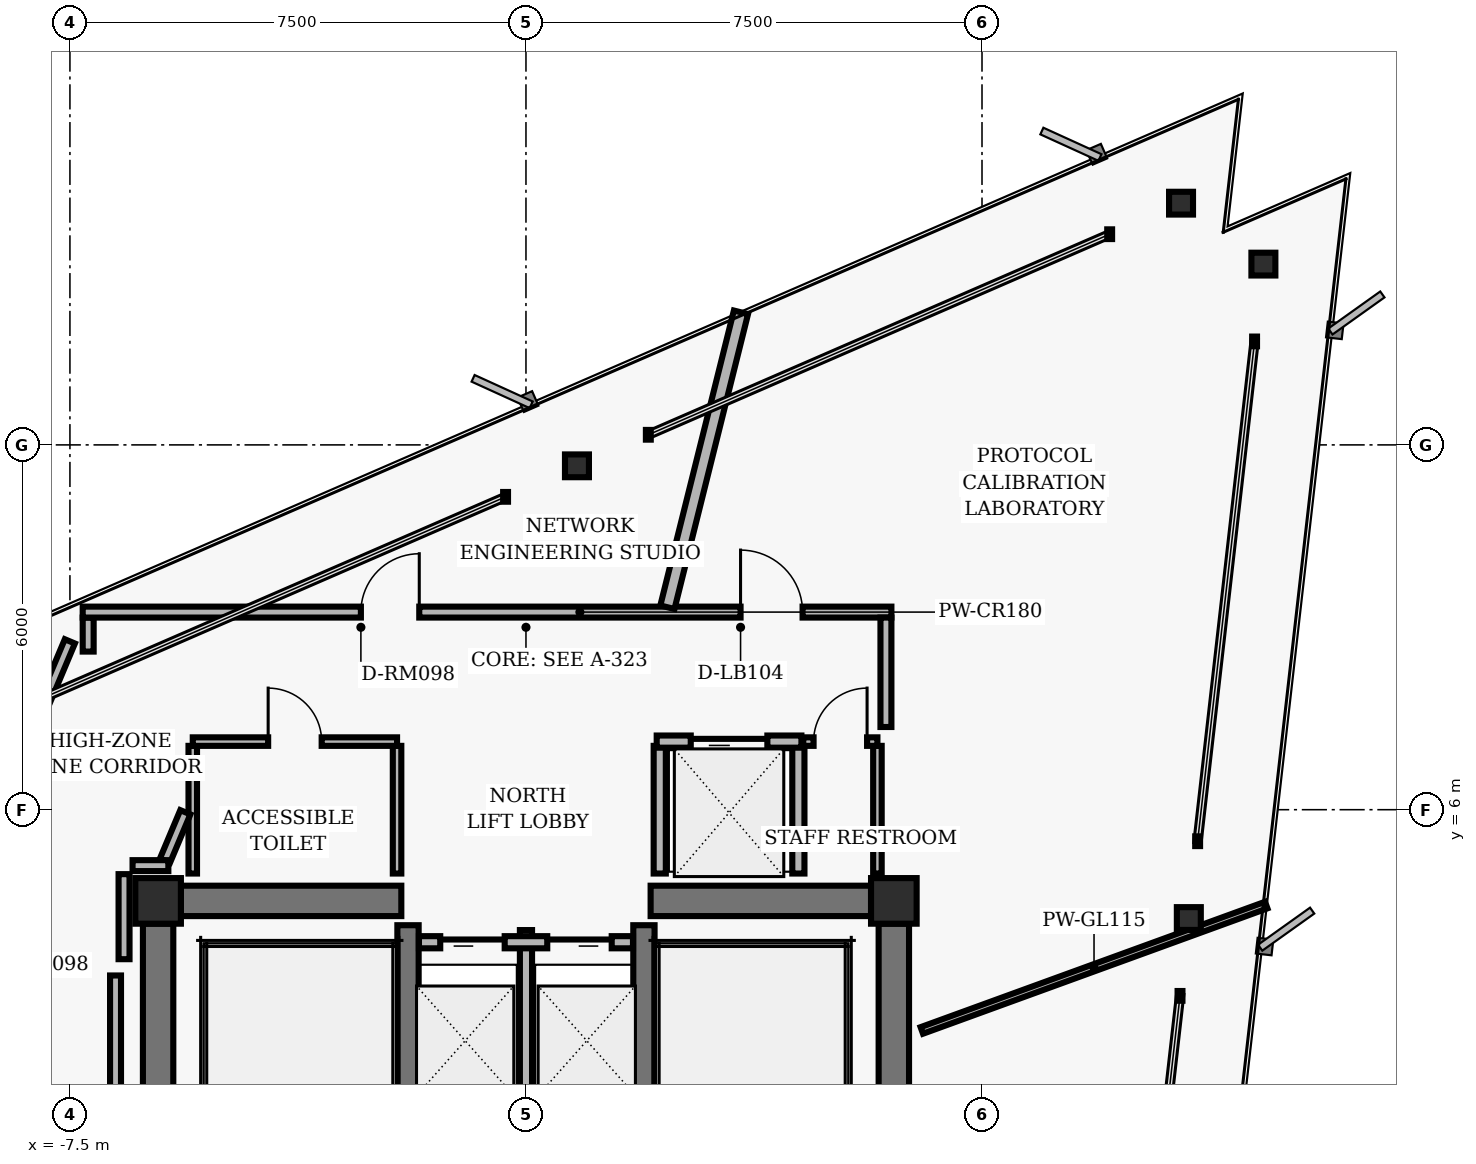
"""IFC4 building model, lengths in metres.
Left out: names, types, materials, properties, quantities, classifications, styles, units other than length and angle.
Written with IfcOpenShell. Run it as: python <this file> out.ifc"""

import sys

from ifc_helpers import new_model, si_unit, direction, frame, frame_2d, origin, origin_2d, place, context, subcontext, project, spatial, rectangle, hollow_rectangle, i_section, extrude, element, fill, save


model = new_model("IFC4")
c1 = context("Model", 3, precision=1e-05, world=origin(), true_north=direction((0.0, 1.0)))
c2 = subcontext(c1, "Body", "Model", "MODEL_VIEW")
j1 = project(units=[si_unit("LENGTHUNIT", "METRE"), si_unit("PLANEANGLEUNIT", "RADIAN")], contexts=[c1])
p1 = place(None, origin())
s1 = spatial("IfcSite", under=j1, at=p1, CompositionType="ELEMENT")
p2 = place(p1, origin())
s2 = spatial("IfcBuilding", under=s1, at=p2, CompositionType="ELEMENT")
p3 = place(p2, frame((0.0, 0.0, 214.88)))
s3 = spatial("IfcBuildingStorey", under=s2, at=p3, CompositionType="ELEMENT", Elevation=214.88)
for number, where, z_axis, x_axis in (
    (1, (-6.05, 4.5, 0.0), (0.0, 0.0, 1.0), (1.0, 0.0, 0.0)),
    (2, (6.05, 4.5, 0.0), (0.0, 0.0, 1.0), (1.0, 0.0, 0.0)),
):
    element("IfcColumn", number, at=place(p3, frame(where, z_axis=z_axis, x_axis=x_axis)), inside=s3, PredefinedType="COLUMN", context=c2, shape_type="SweptSolid", body=[
        extrude(hollow_rectangle(XDim=0.75, YDim=0.75, WallThickness=0.05, InnerFilletRadius=0.02, OuterFilletRadius=0.04, at=origin_2d()), origin(), (0.0, 0.0, 1.0), 3.04),
    ])
for number, where, z_axis, x_axis in (
    (3, (-6.05, 0.375, 0.0), (0.0, 0.0, 1.0), (0.0, 1.0, 0.0)),
    (4, (6.05, 0.375, 0.0), (0.0, 0.0, 1.0), (0.0, 1.0, 0.0)),
):
    element("IfcWall", number, at=place(p3, frame(where, z_axis=z_axis, x_axis=x_axis)), inside=s3, PredefinedType="SHEAR", context=c2, shape_type="SweptSolid", body=[
        extrude(rectangle(XDim=3.75, YDim=0.5, at=frame_2d((1.875, 0.0))), origin(), (0.0, 0.0, 1.0), 2.798),
    ])
for number, where, z_axis, x_axis in (
    (5, (-1.94, -4.1, 0.0), (0.0, 0.0, 1.0), (0.0, 1.0, 0.0)),
    (6, (1.94, -4.1, 0.0), (0.0, 0.0, 1.0), (0.0, 1.0, 0.0)),
):
    element("IfcWall", number, at=place(p3, frame(where, z_axis=z_axis, x_axis=x_axis)), inside=s3, PredefinedType="SHEAR", context=c2, shape_type="SweptSolid", body=[
        extrude(rectangle(XDim=8.2, YDim=0.35, at=frame_2d((4.1, 0.0))), origin(), (0.0, 0.0, 1.0), 2.798),
    ])
for number, where, z_axis, x_axis in (
    (7, (-5.675, 4.5, 0.0), (0.0, 0.0, 1.0), (1.0, 0.0, 0.0)),
    (8, (2.05, 4.5, 0.0), (0.0, 0.0, 1.0), (1.0, 0.0, 0.0)),
):
    element("IfcWall", number, at=place(p3, frame(where, z_axis=z_axis, x_axis=x_axis)), inside=s3, PredefinedType="SHEAR", context=c2, shape_type="SweptSolid", body=[
        extrude(rectangle(XDim=3.625, YDim=0.5, at=frame_2d((1.812, 0.0))), origin(), (0.0, 0.0, 1.0), 2.798),
    ])
for number, where, z_axis, x_axis in (
    (9, (10.901, 4.21, 0.0), (0.0, 0.0, 1.0), (1.0, 0.0, 0.0)),
    (10, (12.128, 14.973, 0.0), (0.0, 0.0, 1.0), (1.0, 0.0, 0.0)),
    (11, (10.773, 15.976, 0.0), (0.0, 0.0, 1.0), (1.0, 0.0, 0.0)),
    (12, (0.838, 11.656, 0.0), (0.0, 0.0, 1.0), (1.0, 0.0, 0.0)),
):
    element("IfcColumn", number, at=place(p3, frame(where, z_axis=z_axis, x_axis=x_axis)), inside=s3, PredefinedType="COLUMN", context=c2, shape_type="SweptSolid", body=[
        extrude(i_section(OverallWidth=0.394, OverallDepth=0.375, WebThickness=0.017, FlangeThickness=0.028, FilletRadius=0.016, at=origin_2d()), origin(), (0.0, 0.0, 1.0), 3.04),
    ])
p4 = place(p3, frame((0.0, 1.25, 0.0), z_axis=(0.0, 0.0, 1.0), x_axis=(0.0, 1.0, 0.0)))
e13 = element("IfcWall", 13, at=p4, inside=s3, PredefinedType="PARTITIONING", context=c2, shape_type="SweptSolid", body=[
    extrude(rectangle(XDim=2.77, YDim=0.2, at=frame_2d((1.385, 0.0))), origin(), (0.0, 0.0, 1.0), 2.773),
])
p5 = place(p3, frame((-1.76, 3.82, 0.0), z_axis=(0.0, 0.0, 1.0), x_axis=(1.0, 0.0, 0.0)))
e14 = element("IfcWall", 14, at=p5, inside=s3, PredefinedType="PARTITIONING", context=c2, shape_type="SweptSolid", body=[
    extrude(rectangle(XDim=3.52, YDim=0.2, at=frame_2d((1.76, 0.0))), origin(), (0.0, 0.0, 1.0), 2.773),
])
p6 = place(p5, frame((0.35, 0.0, 0.0)))
e15 = element("IfcOpeningElement", 15, at=p6, cuts=e14, PredefinedType="OPENING", context=c2, shape_type="SweptSolid", body=[
    extrude(rectangle(XDim=1.06, YDim=2.04, at=frame_2d((0.53, 1.02))), frame((0.0, 0.11, 0.0), z_axis=(0.0, -1.0, 0.0), x_axis=(1.0, 0.0, 0.0)), (0.0, 0.0, 1.0), 0.22),
])
p7 = place(p5, frame((2.11, 0.0, 0.0)))
e16 = element("IfcOpeningElement", 16, at=p7, cuts=e14, PredefinedType="OPENING", context=c2, shape_type="SweptSolid", body=[
    extrude(rectangle(XDim=1.06, YDim=2.04, at=frame_2d((0.53, 1.02))), frame((0.0, 0.11, 0.0), z_axis=(0.0, -1.0, 0.0), x_axis=(1.0, 0.0, 0.0)), (0.0, 0.0, 1.0), 0.22),
])
for number, where, z_axis, x_axis in (
    (17, (2.2, 4.95, 0.0), (0.0, 0.0, 1.0), (0.0, 1.0, 0.0)),
    (18, (4.48, 4.95, 0.0), (0.0, 0.0, 1.0), (0.0, 1.0, 0.0)),
):
    element("IfcWall", number, at=place(p3, frame(where, z_axis=z_axis, x_axis=x_axis)), inside=s3, PredefinedType="PARTITIONING", context=c2, shape_type="SweptSolid", body=[
        extrude(rectangle(XDim=2.1, YDim=0.2, at=frame_2d((1.05, 0.0))), origin(), (0.0, 0.0, 1.0), 2.773),
    ])
p8 = place(p3, frame((2.15, 7.12, 0.0), z_axis=(0.0, 0.0, 1.0), x_axis=(1.0, 0.0, 0.0)))
e19 = element("IfcWall", 19, at=p8, inside=s3, PredefinedType="PARTITIONING", context=c2, shape_type="SweptSolid", body=[
    extrude(rectangle(XDim=2.38, YDim=0.2, at=frame_2d((1.19, 0.0))), origin(), (0.0, 0.0, 1.0), 2.395),
])
p9 = place(p8, frame((0.56, 0.0, 0.0)))
e20 = element("IfcOpeningElement", 20, at=p9, cuts=e19, PredefinedType="OPENING", context=c2, shape_type="SweptSolid", body=[
    extrude(rectangle(XDim=1.26, YDim=2.06, at=frame_2d((0.63, 1.03))), frame((0.0, 0.11, 0.0), z_axis=(0.0, -1.0, 0.0), x_axis=(1.0, 0.0, 0.0)), (0.0, 0.0, 1.0), 0.22),
])
for number, where, z_axis, x_axis in (
    (21, (-5.48, 4.95, 0.0), (0.0, 0.0, 1.0), (0.0, 1.0, 0.0)),
    (22, (-2.12, 4.95, 0.0), (0.0, 0.0, 1.0), (0.0, 1.0, 0.0)),
):
    element("IfcWall", number, at=place(p3, frame(where, z_axis=z_axis, x_axis=x_axis)), inside=s3, PredefinedType="PARTITIONING", context=c2, shape_type="SweptSolid", body=[
        extrude(rectangle(XDim=2.1, YDim=0.14, at=frame_2d((1.05, 0.0))), origin(), (0.0, 0.0, 1.0), 2.773),
    ])
p10 = place(p3, frame((-5.48, 7.12, 0.0), z_axis=(0.0, 0.0, 1.0), x_axis=(1.0, 0.0, 0.0)))
e23 = element("IfcWall", 23, at=p10, inside=s3, PredefinedType="PARTITIONING", context=c2, shape_type="SweptSolid", body=[
    extrude(rectangle(XDim=3.36, YDim=0.14, at=frame_2d((1.68, 0.0))), origin(), (0.0, 0.0, 1.0), 2.395),
])
p11 = place(p10, frame((1.24, 0.0, 0.0)))
e24 = element("IfcOpeningElement", 24, at=p11, cuts=e23, PredefinedType="OPENING", context=c2, shape_type="SweptSolid", body=[
    extrude(rectangle(XDim=0.88, YDim=2.02, at=frame_2d((0.44, 1.01))), frame((0.0, 0.08, 0.0), z_axis=(0.0, -1.0, 0.0), x_axis=(1.0, 0.0, 0.0)), (0.0, 0.0, 1.0), 0.16),
])
p12 = place(p3, frame((5.78, 4.95, 0.0), z_axis=(0.0, 0.0, 1.0), x_axis=(0.0, 1.0, 0.0)))
e25 = element("IfcWall", 25, at=p12, inside=s3, PredefinedType="PARTITIONING", context=c2, shape_type="SweptSolid", body=[
    extrude(rectangle(XDim=2.1, YDim=0.14, at=frame_2d((1.05, 0.0))), origin(), (0.0, 0.0, 1.0), 2.773),
])
p13 = place(p3, frame((4.56, 7.12, 0.0), z_axis=(0.0, 0.0, 1.0), x_axis=(1.0, 0.0, 0.0)))
e26 = element("IfcWall", 26, at=p13, inside=s3, PredefinedType="PARTITIONING", context=c2, shape_type="SweptSolid", body=[
    extrude(rectangle(XDim=1.22, YDim=0.14, at=frame_2d((0.61, 0.0))), origin(), (0.0, 0.0, 1.0), 2.773),
])
p14 = place(p13, frame((0.17, 0.0, 0.0)))
e27 = element("IfcOpeningElement", 27, at=p14, cuts=e26, PredefinedType="OPENING", context=c2, shape_type="SweptSolid", body=[
    extrude(rectangle(XDim=0.88, YDim=2.02, at=frame_2d((0.44, 1.01))), frame((0.0, 0.08, 0.0), z_axis=(0.0, -1.0, 0.0), x_axis=(1.0, 0.0, 0.0)), (0.0, 0.0, 1.0), 0.16),
])
p15 = place(p3, frame((-9.367, 4.332, 0.0), z_axis=(0.0, 0.0, 1.0), x_axis=(0.387573945081, 0.921838617706, 0.0)))
e28 = element("IfcWall", 28, at=p15, inside=s3, PredefinedType="PARTITIONING", context=c2, shape_type="SweptSolid", body=[
    extrude(rectangle(XDim=4.813, YDim=0.18, at=frame_2d((2.407, 0.0))), origin(), (0.0, 0.0, 1.0), 2.773),
])
p16 = place(p15, frame((0.302, 0.0, 0.0)))
e29 = element("IfcOpeningElement", 29, at=p16, cuts=e28, PredefinedType="OPENING", context=c2, shape_type="SweptSolid", body=[
    extrude(rectangle(XDim=0.96, YDim=2.02, at=frame_2d((0.48, 1.01))), frame((0.0, 0.1, 0.0), z_axis=(0.0, -1.0, 0.0), x_axis=(1.0, 0.0, 0.0)), (0.0, 0.0, 1.0), 0.2),
])
p17 = place(p3, frame((-7.2, 8.601, 0.0), z_axis=(0.0, 0.0, 1.0), x_axis=(0.0, 1.0, 0.0)))
e30 = element("IfcWall", 30, at=p17, inside=s3, PredefinedType="PARTITIONING", context=c2, shape_type="SweptSolid", body=[
    extrude(rectangle(XDim=0.559, YDim=0.18, at=frame_2d((0.28, 0.0))), origin(), (0.0, 0.0, 1.0), 2.773),
])
p18 = place(p3, frame((-7.29, 9.25, 0.0), z_axis=(0.0, 0.0, 1.0), x_axis=(1.0, 0.0, 0.0)))
e31 = element("IfcWall", 31, at=p18, inside=s3, PredefinedType="PARTITIONING", context=c2, shape_type="SweptSolid", body=[
    extrude(rectangle(XDim=13.3, YDim=0.18, at=frame_2d((6.65, 0.0))), origin(), (0.0, 0.0, 1.0), 2.395),
])
p19 = place(p18, frame((10.819, 0.0, 0.0)))
e32 = element("IfcOpeningElement", 32, at=p19, cuts=e31, PredefinedType="OPENING", context=c2, shape_type="SweptSolid", body=[
    extrude(rectangle(XDim=1.02, YDim=2.02, at=frame_2d((0.51, 1.01))), frame((0.0, 0.1, 0.0), z_axis=(0.0, -1.0, 0.0), x_axis=(1.0, 0.0, 0.0)), (0.0, 0.0, 1.0), 0.2),
])
p20 = place(p18, frame((4.575, 0.0, 0.0)))
e33 = element("IfcOpeningElement", 33, at=p20, cuts=e31, PredefinedType="OPENING", context=c2, shape_type="SweptSolid", body=[
    extrude(rectangle(XDim=0.96, YDim=2.02, at=frame_2d((0.48, 1.01))), frame((0.0, 0.1, 0.0), z_axis=(0.0, -1.0, 0.0), x_axis=(1.0, 0.0, 0.0)), (0.0, 0.0, 1.0), 0.2),
])
p21 = place(p3, frame((5.92, 9.16, 0.0), z_axis=(0.0, 0.0, 1.0), x_axis=(0.0, -1.0, 0.0)))
e34 = element("IfcWall", 34, at=p21, inside=s3, PredefinedType="PARTITIONING", context=c2, shape_type="SweptSolid", body=[
    extrude(rectangle(XDim=1.8, YDim=0.18, at=frame_2d((0.9, 0.0))), origin(), (0.0, 0.0, 1.0), 2.773),
])
p22 = place(p3, frame((-5.602, 5.958, 0.0), z_axis=(0.0, 0.0, 1.0), x_axis=(-0.387588639363, -0.921832439566, 0.0)))
e35 = element("IfcWall", 35, at=p22, inside=s3, PredefinedType="PARTITIONING", context=c2, shape_type="SweptSolid", body=[
    extrude(rectangle(XDim=0.862, YDim=0.18, at=frame_2d((0.431, 0.0))), origin(), (0.0, 0.0, 1.0), 2.773),
])
p23 = place(p3, frame((-5.881, 5.08, 0.0), z_axis=(0.0, 0.0, 1.0), x_axis=(-1.0, 0.0, 0.0)))
e36 = element("IfcWall", 36, at=p23, inside=s3, PredefinedType="PARTITIONING", context=c2, shape_type="SweptSolid", body=[
    extrude(rectangle(XDim=0.589, YDim=0.18, at=frame_2d((0.294, 0.0))), origin(), (0.0, 0.0, 1.0), 2.773),
])
p24 = place(p3, frame((-6.61, 4.94, 0.0), z_axis=(0.0, 0.0, 1.0), x_axis=(0.0, -1.0, 0.0)))
e37 = element("IfcWall", 37, at=p24, inside=s3, PredefinedType="PARTITIONING", context=c2, shape_type="SweptSolid", body=[
    extrude(rectangle(XDim=1.399, YDim=0.18, at=frame_2d((0.699, 0.0))), origin(), (0.0, 0.0, 1.0), 2.773),
])
p25 = place(p3, frame((-6.75, 3.273, 0.0), z_axis=(0.0, 0.0, 1.0), x_axis=(0.0, -1.0, 0.0)))
e38 = element("IfcWall", 38, at=p25, inside=s3, PredefinedType="PARTITIONING", context=c2, shape_type="SweptSolid", body=[
    extrude(rectangle(XDim=6.547, YDim=0.18, at=frame_2d((3.273, 0.0))), origin(), (0.0, 0.0, 1.0), 2.773),
])
p26 = place(p3, frame((6.51, 2.369, 0.0), z_axis=(0.0, 0.0, 1.0), x_axis=(0.939690503952, 0.342025959222, 0.0)))
e39 = element("IfcWall", 39, at=p26, inside=s3, PredefinedType="MOVABLE", context=c2, shape_type="SweptSolid", body=[
    extrude(rectangle(XDim=6.028, YDim=0.115, at=frame_2d((3.014, 0.0))), origin(), (0.0, 0.0, 1.0), 2.773),
])
p27 = place(p3, frame((2.326, 9.33, 0.0), z_axis=(0.0, 0.0, 1.0), x_axis=(0.24192658113, 0.97029455803, 0.0)))
e40 = element("IfcWall", 40, at=p27, inside=s3, PredefinedType="PARTITIONING", context=c2, shape_type="SweptSolid", body=[
    extrude(rectangle(XDim=4.999, YDim=0.24, at=frame_2d((2.5, 0.0))), origin(), (0.0, 0.0, 1.0), 2.773),
])
p28 = place(p6, origin())
e41 = element("IfcDoor", 41, at=p28, inside=s3, OperationType="SLIDING_TO_LEFT", PredefinedType="DOOR", context=c2, shape_type="SweptSolid", body=[
    extrude(rectangle(XDim=1.06, YDim=2.04, at=frame_2d((0.53, 1.02))), frame((0.0, 0.025, 0.0), z_axis=(0.0, -1.0, 0.0), x_axis=(1.0, 0.0, 0.0)), (0.0, 0.0, 1.0), 0.05),
])
fill(e15, e41)
p29 = place(p7, origin())
e42 = element("IfcDoor", 42, at=p29, inside=s3, OperationType="SLIDING_TO_RIGHT", PredefinedType="DOOR", context=c2, shape_type="SweptSolid", body=[
    extrude(rectangle(XDim=1.06, YDim=2.04, at=frame_2d((0.53, 1.02))), frame((0.0, 0.025, 0.0), z_axis=(0.0, -1.0, 0.0), x_axis=(1.0, 0.0, 0.0)), (0.0, 0.0, 1.0), 0.05),
])
fill(e16, e42)
p30 = place(p9, origin())
e43 = element("IfcDoor", 43, at=p30, inside=s3, OperationType="SLIDING_TO_LEFT", PredefinedType="DOOR", context=c2, shape_type="SweptSolid", body=[
    extrude(rectangle(XDim=1.26, YDim=2.06, at=frame_2d((0.63, 1.03))), frame((0.0, 0.025, 0.0), z_axis=(0.0, -1.0, 0.0), x_axis=(1.0, 0.0, 0.0)), (0.0, 0.0, 1.0), 0.05),
])
fill(e20, e43)
p31 = place(p11, origin())
e44 = element("IfcDoor", 44, at=p31, inside=s3, OperationType="SINGLE_SWING_LEFT", PredefinedType="DOOR", context=c2, shape_type="SweptSolid", body=[
    extrude(rectangle(XDim=0.88, YDim=2.02, at=frame_2d((0.44, 1.01))), frame((0.0, 0.025, 0.0), z_axis=(0.0, -1.0, 0.0), x_axis=(1.0, 0.0, 0.0)), (0.0, 0.0, 1.0), 0.05),
])
fill(e24, e44)
p32 = place(p14, origin())
e45 = element("IfcDoor", 45, at=p32, inside=s3, OperationType="SINGLE_SWING_RIGHT", PredefinedType="DOOR", context=c2, shape_type="SweptSolid", body=[
    extrude(rectangle(XDim=0.88, YDim=2.02, at=frame_2d((0.44, 1.01))), frame((0.0, 0.025, 0.0), z_axis=(0.0, -1.0, 0.0), x_axis=(1.0, 0.0, 0.0)), (0.0, 0.0, 1.0), 0.05),
])
fill(e27, e45)
p33 = place(p19, origin())
e46 = element("IfcDoor", 46, at=p33, inside=s3, OperationType="SINGLE_SWING_LEFT", PredefinedType="DOOR", context=c2, shape_type="SweptSolid", body=[
    extrude(rectangle(XDim=1.02, YDim=2.02, at=frame_2d((0.51, 1.01))), frame((0.0, 0.025, 0.0), z_axis=(0.0, -1.0, 0.0), x_axis=(1.0, 0.0, 0.0)), (0.0, 0.0, 1.0), 0.05),
])
fill(e32, e46)
p34 = place(p20, origin())
e47 = element("IfcDoor", 47, at=p34, inside=s3, OperationType="SINGLE_SWING_RIGHT", PredefinedType="DOOR", context=c2, shape_type="SweptSolid", body=[
    extrude(rectangle(XDim=0.96, YDim=2.02, at=frame_2d((0.48, 1.01))), frame((0.0, 0.025, 0.0), z_axis=(0.0, -1.0, 0.0), x_axis=(1.0, 0.0, 0.0)), (0.0, 0.0, 1.0), 0.05),
])
fill(e33, e47)
save(model, sys.argv[1])
